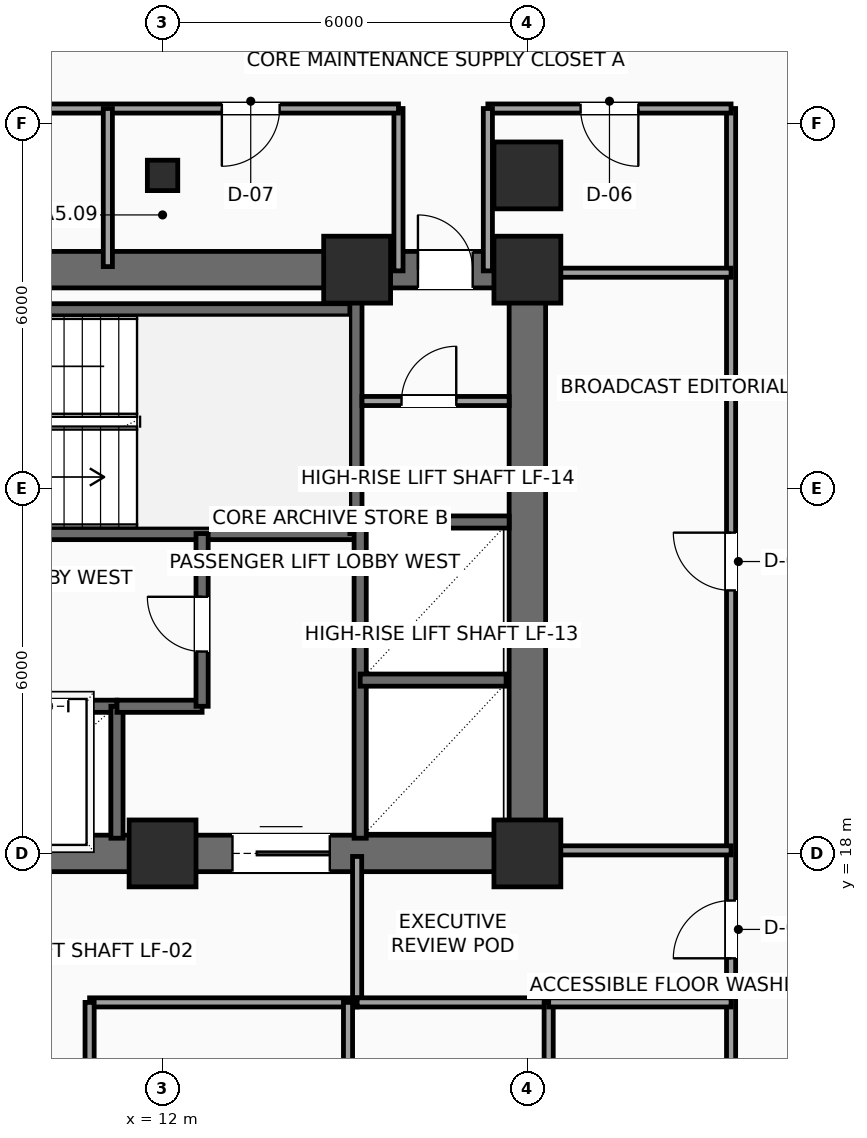
"""IFC4 building model, lengths in metres.
Left out: names, types, materials, properties, quantities, classifications, styles, units other than length and angle.
Written with IfcOpenShell. Run it as: python <this file> out.ifc"""

import sys

from ifc_helpers import new_model, si_unit, direction, frame, frame_2d, origin, origin_2d, place, context, subcontext, project, spatial, rectangle, hollow_rectangle, extrude, element, fill, save


model = new_model("IFC4")
c1 = context("Model", 3, precision=1e-05, world=origin(), true_north=direction((0.0, 1.0)))
c2 = subcontext(c1, "Body", "Model", "MODEL_VIEW")
j1 = project(units=[si_unit("LENGTHUNIT", "METRE"), si_unit("PLANEANGLEUNIT", "RADIAN")], contexts=[c1])
p1 = place(None, origin())
s1 = spatial("IfcSite", under=j1, at=p1, CompositionType="ELEMENT")
p2 = place(p1, origin())
s2 = spatial("IfcBuilding", under=s1, at=p2, CompositionType="ELEMENT")
p3 = place(p2, frame((0.0, 0.0, 160.65)))
s3 = spatial("IfcBuildingStorey", under=s2, at=p3, CompositionType="ELEMENT", Elevation=160.65)
for number, where, z_axis, x_axis in (
    (1, (12.0, 18.0, 0.0), (0.0, 0.0, 1.0), (1.0, 0.0, 0.0)),
    (2, (18.0, 18.0, 0.0), (0.0, 0.0, 1.0), (1.0, 0.0, 0.0)),
    (3, (15.2, 27.6, 0.0), (0.0, 0.0, 1.0), (1.0, 0.0, 0.0)),
    (4, (18.0, 27.6, 0.0), (0.0, 0.0, 1.0), (1.0, 0.0, 0.0)),
):
    element("IfcColumn", number, at=place(p3, frame(where, z_axis=z_axis, x_axis=x_axis)), inside=s3, PredefinedType="COLUMN", context=c2, shape_type="SweptSolid", body=[
        extrude(rectangle(XDim=1.1, YDim=1.1, at=origin_2d()), origin(), (0.0, 0.0, 1.0), 3.75),
    ])
p4 = place(p3, frame((12.0, 29.15, 0.0), z_axis=(0.0, 0.0, 1.0), x_axis=(1.0, 0.0, 0.0)))
e5 = element("IfcColumn", 5, at=p4, inside=s3, PredefinedType="COLUMN", context=c2, shape_type="SweptSolid", body=[
    extrude(hollow_rectangle(XDim=0.5, YDim=0.5, WallThickness=0.025, InnerFilletRadius=0.025, OuterFilletRadius=0.04, at=origin_2d()), origin(), (0.0, 0.0, 1.0), 3.75),
])
p5 = place(p3, frame((18.0, 29.15, 0.0), z_axis=(0.0, 0.0, 1.0), x_axis=(1.0, 0.0, 0.0)))
e6 = element("IfcColumn", 6, at=p5, inside=s3, PredefinedType="COLUMN", context=c2, shape_type="SweptSolid", body=[
    extrude(rectangle(XDim=1.1, YDim=1.1, at=origin_2d()), origin(), (0.0, 0.0, 1.0), 3.75),
])
p6 = place(p3, frame((6.0, 18.0, 0.0), z_axis=(0.0, 0.0, 1.0), x_axis=(1.0, 0.0, 0.0)))
e7 = element("IfcWall", 7, at=p6, inside=s3, PredefinedType="SHEAR", context=c2, shape_type="SweptSolid", body=[
    extrude(rectangle(XDim=12.0, YDim=0.6, at=frame_2d((6.0, 0.0))), origin(), (0.0, 0.0, 1.0), 3.425),
])
p7 = place(p6, frame((7.15, 0.0, 0.0)))
e8 = element("IfcOpeningElement", 8, at=p7, cuts=e7, PredefinedType="OPENING", context=c2, shape_type="SweptSolid", body=[
    extrude(rectangle(XDim=1.6, YDim=2.3, at=frame_2d((0.8, 1.15))), frame((0.0, 0.31, 0.0), z_axis=(0.0, -1.0, 0.0), x_axis=(1.0, 0.0, 0.0)), (0.0, 0.0, 1.0), 0.62),
])
p8 = place(p3, frame((6.0, 27.6, 0.0), z_axis=(0.0, 0.0, 1.0), x_axis=(1.0, 0.0, 0.0)))
e9 = element("IfcWall", 9, at=p8, inside=s3, PredefinedType="SHEAR", context=c2, shape_type="SweptSolid", body=[
    extrude(rectangle(XDim=12.0, YDim=0.6, at=frame_2d((6.0, 0.0))), origin(), (0.0, 0.0, 1.0), 3.425),
])
p9 = place(p8, frame((10.2, 0.0, 0.0)))
e10 = element("IfcOpeningElement", 10, at=p9, cuts=e9, PredefinedType="OPENING", context=c2, shape_type="SweptSolid", body=[
    extrude(rectangle(XDim=0.9, YDim=2.15, at=frame_2d((0.45, 1.075))), frame((0.0, 0.31, 0.0), z_axis=(0.0, -1.0, 0.0), x_axis=(1.0, 0.0, 0.0)), (0.0, 0.0, 1.0), 0.62),
])
p10 = place(p3, frame((18.0, 18.0, 0.0), z_axis=(0.0, 0.0, 1.0), x_axis=(0.0, 1.0, 0.0)))
e11 = element("IfcWall", 11, at=p10, inside=s3, PredefinedType="SHEAR", context=c2, shape_type="SweptSolid", body=[
    extrude(rectangle(XDim=9.6, YDim=0.6, at=frame_2d((4.8, 0.0))), origin(), (0.0, 0.0, 1.0), 3.425),
])
p11 = place(p3, frame((6.3, 23.26, 0.0), z_axis=(0.0, 0.0, 1.0), x_axis=(1.0, 0.0, 0.0)))
e12 = element("IfcWall", 12, at=p11, inside=s3, PredefinedType="SHEAR", context=c2, shape_type="SweptSolid", body=[
    extrude(rectangle(XDim=8.88, YDim=0.2, at=frame_2d((4.44, 0.0))), origin(), (0.0, 0.0, 1.0), 3.425),
])
p12 = place(p11, frame((0.35, 0.0, 0.0)))
e13 = element("IfcOpeningElement", 13, at=p12, cuts=e12, PredefinedType="OPENING", context=c2, shape_type="SweptSolid", body=[
    extrude(rectangle(XDim=1.1, YDim=2.2, at=frame_2d((0.55, 1.1))), frame((0.0, 0.11, 0.0), z_axis=(0.0, -1.0, 0.0), x_axis=(1.0, 0.0, 0.0)), (0.0, 0.0, 1.0), 0.22),
])
p13 = place(p3, frame((6.3, 26.94, 0.0), z_axis=(0.0, 0.0, 1.0), x_axis=(1.0, 0.0, 0.0)))
e14 = element("IfcWall", 14, at=p13, inside=s3, PredefinedType="SHEAR", context=c2, shape_type="SweptSolid", body=[
    extrude(rectangle(XDim=8.88, YDim=0.2, at=frame_2d((4.44, 0.0))), origin(), (0.0, 0.0, 1.0), 3.425),
])
p14 = place(p3, frame((15.18, 23.26, 0.0), z_axis=(0.0, 0.0, 1.0), x_axis=(0.0, 1.0, 0.0)))
e15 = element("IfcWall", 15, at=p14, inside=s3, PredefinedType="SHEAR", context=c2, shape_type="SweptSolid", body=[
    extrude(rectangle(XDim=4.04, YDim=0.2, at=frame_2d((2.02, 0.0))), origin(), (0.0, 0.0, 1.0), 3.425),
])
p15 = place(p3, frame((6.3, 20.42, 0.0), z_axis=(0.0, 0.0, 1.0), x_axis=(1.0, 0.0, 0.0)))
e16 = element("IfcWall", 16, at=p15, inside=s3, PredefinedType="SHEAR", context=c2, shape_type="SweptSolid", body=[
    extrude(rectangle(XDim=4.95, YDim=0.2, at=frame_2d((2.475, 0.0))), origin(), (0.0, 0.0, 1.0), 3.425),
])
p16 = place(p15, frame((0.65, 0.0, 0.0)))
e17 = element("IfcOpeningElement", 17, at=p16, cuts=e16, PredefinedType="OPENING", context=c2, shape_type="SweptSolid", body=[
    extrude(rectangle(XDim=1.1, YDim=2.2, at=frame_2d((0.55, 1.1))), frame((0.0, 0.11, 0.0), z_axis=(0.0, -1.0, 0.0), x_axis=(1.0, 0.0, 0.0)), (0.0, 0.0, 1.0), 0.22),
])
p17 = place(p15, frame((3.05, 0.0, 0.0)))
e18 = element("IfcOpeningElement", 18, at=p17, cuts=e16, PredefinedType="OPENING", context=c2, shape_type="SweptSolid", body=[
    extrude(rectangle(XDim=1.1, YDim=2.2, at=frame_2d((0.55, 1.1))), frame((0.0, 0.11, 0.0), z_axis=(0.0, -1.0, 0.0), x_axis=(1.0, 0.0, 0.0)), (0.0, 0.0, 1.0), 0.22),
])
p18 = place(p3, frame((11.25, 18.25, 0.0), z_axis=(0.0, 0.0, 1.0), x_axis=(0.0, 1.0, 0.0)))
e19 = element("IfcWall", 19, at=p18, inside=s3, PredefinedType="SHEAR", context=c2, shape_type="SweptSolid", body=[
    extrude(rectangle(XDim=2.17, YDim=0.2, at=frame_2d((1.085, 0.0))), origin(), (0.0, 0.0, 1.0), 3.425),
])
p19 = place(p3, frame((11.25, 20.42, 0.0), z_axis=(0.0, 0.0, 1.0), x_axis=(1.0, 0.0, 0.0)))
e20 = element("IfcWall", 20, at=p19, inside=s3, PredefinedType="SHEAR", context=c2, shape_type="SweptSolid", body=[
    extrude(rectangle(XDim=1.4, YDim=0.2, at=frame_2d((0.7, 0.0))), origin(), (0.0, 0.0, 1.0), 3.425),
])
p20 = place(p3, frame((12.65, 20.42, 0.0), z_axis=(0.0, 0.0, 1.0), x_axis=(0.0, 1.0, 0.0)))
e21 = element("IfcWall", 21, at=p20, inside=s3, PredefinedType="SHEAR", context=c2, shape_type="SweptSolid", body=[
    extrude(rectangle(XDim=2.84, YDim=0.2, at=frame_2d((1.42, 0.0))), origin(), (0.0, 0.0, 1.0), 3.425),
])
p21 = place(p20, frame((0.9, 0.0, 0.0)))
e22 = element("IfcOpeningElement", 22, at=p21, cuts=e21, PredefinedType="OPENING", context=c2, shape_type="SweptSolid", body=[
    extrude(rectangle(XDim=0.9, YDim=2.15, at=frame_2d((0.45, 1.075))), frame((0.0, 0.11, 0.0), z_axis=(0.0, -1.0, 0.0), x_axis=(1.0, 0.0, 0.0)), (0.0, 0.0, 1.0), 0.22),
])
p22 = place(p3, frame((15.25, 18.25, 0.0), z_axis=(0.0, 0.0, 1.0), x_axis=(0.0, 1.0, 0.0)))
e23 = element("IfcWall", 23, at=p22, inside=s3, PredefinedType="SHEAR", context=c2, shape_type="SweptSolid", body=[
    extrude(rectangle(XDim=5.2, YDim=0.2, at=frame_2d((2.6, 0.0))), origin(), (0.0, 0.0, 1.0), 3.425),
])
p23 = place(p3, frame((15.25, 20.85, 0.0), z_axis=(0.0, 0.0, 1.0), x_axis=(1.0, 0.0, 0.0)))
e24 = element("IfcWall", 24, at=p23, inside=s3, PredefinedType="SHEAR", context=c2, shape_type="SweptSolid", body=[
    extrude(rectangle(XDim=2.4, YDim=0.2, at=frame_2d((1.2, 0.0))), origin(), (0.0, 0.0, 1.0), 3.425),
])
p24 = place(p3, frame((15.25, 23.45, 0.0), z_axis=(0.0, 0.0, 1.0), x_axis=(1.0, 0.0, 0.0)))
e25 = element("IfcWall", 25, at=p24, inside=s3, PredefinedType="SHEAR", context=c2, shape_type="SweptSolid", body=[
    extrude(rectangle(XDim=2.45, YDim=0.2, at=frame_2d((1.225, 0.0))), origin(), (0.0, 0.0, 1.0), 3.425),
])
p25 = place(p3, frame((15.28, 25.44, 0.0), z_axis=(0.0, 0.0, 1.0), x_axis=(1.0, 0.0, 0.0)))
e26 = element("IfcWall", 26, at=p25, inside=s3, PredefinedType="PARTITIONING", context=c2, shape_type="SweptSolid", body=[
    extrude(rectangle(XDim=2.42, YDim=0.15, at=frame_2d((1.21, 0.0))), origin(), (0.0, 0.0, 1.0), 3.425),
])
p26 = place(p25, frame((0.65, 0.0, 0.0)))
e27 = element("IfcOpeningElement", 27, at=p26, cuts=e26, PredefinedType="OPENING", context=c2, shape_type="SweptSolid", body=[
    extrude(rectangle(XDim=0.9, YDim=2.15, at=frame_2d((0.45, 1.075))), frame((0.0, 0.085, 0.0), z_axis=(0.0, -1.0, 0.0), x_axis=(1.0, 0.0, 0.0)), (0.0, 0.0, 1.0), 0.17),
])
p27 = place(p3, frame((15.2, 17.95, 0.0), z_axis=(0.0, 0.0, 1.0), x_axis=(0.0, -1.0, 0.0)))
e28 = element("IfcWall", 28, at=p27, inside=s3, PredefinedType="PARTITIONING", context=c2, shape_type="SweptSolid", body=[
    extrude(rectangle(XDim=2.4, YDim=0.15, at=frame_2d((1.2, 0.0))), origin(), (0.0, 0.0, 1.0), 3.425),
])
p28 = place(p3, frame((15.2, 15.55, 0.0), z_axis=(0.0, 0.0, 1.0), x_axis=(-1.0, 0.0, 0.0)))
e29 = element("IfcWall", 29, at=p28, inside=s3, PredefinedType="PARTITIONING", context=c2, shape_type="SweptSolid", body=[
    extrude(rectangle(XDim=4.4, YDim=0.15, at=frame_2d((2.2, 0.0))), origin(), (0.0, 0.0, 1.0), 3.425),
])
p29 = place(p3, frame((10.8, 15.55, 0.0), z_axis=(0.0, 0.0, 1.0), x_axis=(0.0, -1.0, 0.0)))
e30 = element("IfcWall", 30, at=p29, inside=s3, PredefinedType="PARTITIONING", context=c2, shape_type="SweptSolid", body=[
    extrude(rectangle(XDim=4.3, YDim=0.15, at=frame_2d((2.15, 0.0))), origin(), (0.0, 0.0, 1.0), 3.425),
])
p30 = place(p3, frame((21.35, 11.25, 0.0), z_axis=(0.0, 0.0, 1.0), x_axis=(0.0, 1.0, 0.0)))
e31 = element("IfcWall", 31, at=p30, inside=s3, PredefinedType="PARTITIONING", context=c2, shape_type="SweptSolid", body=[
    extrude(rectangle(XDim=19.0, YDim=0.15, at=frame_2d((9.5, 0.0))), origin(), (0.0, 0.0, 1.0), 3.425),
])
p31 = place(p30, frame((11.075, 0.0, 0.0)))
e32 = element("IfcOpeningElement", 32, at=p31, cuts=e31, PredefinedType="OPENING", context=c2, shape_type="SweptSolid", body=[
    extrude(rectangle(XDim=0.95, YDim=2.15, at=frame_2d((0.475, 1.075))), frame((0.0, 0.085, 0.0), z_axis=(0.0, -1.0, 0.0), x_axis=(1.0, 0.0, 0.0)), (0.0, 0.0, 1.0), 0.17),
])
p32 = place(p30, frame((5.025, 0.0, 0.0)))
e33 = element("IfcOpeningElement", 33, at=p32, cuts=e31, PredefinedType="OPENING", context=c2, shape_type="SweptSolid", body=[
    extrude(rectangle(XDim=0.95, YDim=2.15, at=frame_2d((0.475, 1.075))), frame((0.0, 0.085, 0.0), z_axis=(0.0, -1.0, 0.0), x_axis=(1.0, 0.0, 0.0)), (0.0, 0.0, 1.0), 0.17),
])
p33 = place(p3, frame((21.35, 30.25, 0.0), z_axis=(0.0, 0.0, 1.0), x_axis=(-1.0, 0.0, 0.0)))
e34 = element("IfcWall", 34, at=p33, inside=s3, PredefinedType="PARTITIONING", context=c2, shape_type="SweptSolid", body=[
    extrude(rectangle(XDim=4.0, YDim=0.15, at=frame_2d((2.0, 0.0))), origin(), (0.0, 0.0, 1.0), 3.425),
])
p34 = place(p33, frame((1.525, 0.0, 0.0)))
e35 = element("IfcOpeningElement", 35, at=p34, cuts=e34, PredefinedType="OPENING", context=c2, shape_type="SweptSolid", body=[
    extrude(rectangle(XDim=0.95, YDim=2.15, at=frame_2d((0.475, 1.075))), frame((0.0, 0.085, 0.0), z_axis=(0.0, -1.0, 0.0), x_axis=(1.0, 0.0, 0.0)), (0.0, 0.0, 1.0), 0.17),
])
for number, where, z_axis, x_axis in (
    (36, (17.35, 30.25, 0.0), (0.0, 0.0, 1.0), (0.0, -1.0, 0.0)),
    (37, (15.88, 27.58, 0.0), (0.0, 0.0, 1.0), (0.0, 1.0, 0.0)),
):
    element("IfcWall", number, at=place(p3, frame(where, z_axis=z_axis, x_axis=x_axis)), inside=s3, PredefinedType="PARTITIONING", context=c2, shape_type="SweptSolid", body=[
        extrude(rectangle(XDim=2.67, YDim=0.15, at=frame_2d((1.335, 0.0))), origin(), (0.0, 0.0, 1.0), 3.425),
    ])
p35 = place(p3, frame((15.88, 30.25, 0.0), z_axis=(0.0, 0.0, 1.0), x_axis=(-1.0, 0.0, 0.0)))
e38 = element("IfcWall", 38, at=p35, inside=s3, PredefinedType="PARTITIONING", context=c2, shape_type="SweptSolid", body=[
    extrude(rectangle(XDim=15.58, YDim=0.15, at=frame_2d((7.79, 0.0))), origin(), (0.0, 0.0, 1.0), 3.425),
])
p36 = place(p35, frame((13.61, 0.0, 0.0)))
e39 = element("IfcOpeningElement", 39, at=p36, cuts=e38, PredefinedType="OPENING", context=c2, shape_type="SweptSolid", body=[
    extrude(rectangle(XDim=0.95, YDim=2.15, at=frame_2d((0.475, 1.075))), frame((0.0, 0.085, 0.0), z_axis=(0.0, -1.0, 0.0), x_axis=(1.0, 0.0, 0.0)), (0.0, 0.0, 1.0), 0.17),
])
p37 = place(p35, frame((10.855, 0.0, 0.0)))
e40 = element("IfcOpeningElement", 40, at=p37, cuts=e38, PredefinedType="OPENING", context=c2, shape_type="SweptSolid", body=[
    extrude(rectangle(XDim=0.95, YDim=2.15, at=frame_2d((0.475, 1.075))), frame((0.0, 0.085, 0.0), z_axis=(0.0, -1.0, 0.0), x_axis=(1.0, 0.0, 0.0)), (0.0, 0.0, 1.0), 0.17),
])
p38 = place(p35, frame((6.705, 0.0, 0.0)))
e41 = element("IfcOpeningElement", 41, at=p38, cuts=e38, PredefinedType="OPENING", context=c2, shape_type="SweptSolid", body=[
    extrude(rectangle(XDim=0.95, YDim=2.15, at=frame_2d((0.475, 1.075))), frame((0.0, 0.085, 0.0), z_axis=(0.0, -1.0, 0.0), x_axis=(1.0, 0.0, 0.0)), (0.0, 0.0, 1.0), 0.17),
])
p39 = place(p35, frame((1.955, 0.0, 0.0)))
e42 = element("IfcOpeningElement", 42, at=p39, cuts=e38, PredefinedType="OPENING", context=c2, shape_type="SweptSolid", body=[
    extrude(rectangle(XDim=0.95, YDim=2.15, at=frame_2d((0.475, 1.075))), frame((0.0, 0.085, 0.0), z_axis=(0.0, -1.0, 0.0), x_axis=(1.0, 0.0, 0.0)), (0.0, 0.0, 1.0), 0.17),
])
p40 = place(p3, frame((15.05, 11.25, 0.0), z_axis=(0.0, 0.0, 1.0), x_axis=(0.0, 1.0, 0.0)))
e43 = element("IfcWall", 43, at=p40, inside=s3, PredefinedType="PARTITIONING", context=c2, shape_type="SweptSolid", body=[
    extrude(rectangle(XDim=4.3, YDim=0.15, at=frame_2d((2.15, 0.0))), origin(), (0.0, 0.0, 1.0), 3.425),
])
p41 = place(p3, frame((15.2, 15.55, 0.0), z_axis=(0.0, 0.0, 1.0), x_axis=(1.0, 0.0, 0.0)))
e44 = element("IfcWall", 44, at=p41, inside=s3, PredefinedType="PARTITIONING", context=c2, shape_type="SweptSolid", body=[
    extrude(rectangle(XDim=3.15, YDim=0.15, at=frame_2d((1.575, 0.0))), origin(), (0.0, 0.0, 1.0), 3.425),
])
p42 = place(p3, frame((18.35, 11.25, 0.0), z_axis=(0.0, 0.0, 1.0), x_axis=(0.0, 1.0, 0.0)))
e45 = element("IfcWall", 45, at=p42, inside=s3, PredefinedType="PARTITIONING", context=c2, shape_type="SweptSolid", body=[
    extrude(rectangle(XDim=4.3, YDim=0.15, at=frame_2d((2.15, 0.0))), origin(), (0.0, 0.0, 1.0), 3.425),
])
p43 = place(p3, frame((18.35, 15.55, 0.0), z_axis=(0.0, 0.0, 1.0), x_axis=(1.0, 0.0, 0.0)))
e46 = element("IfcWall", 46, at=p43, inside=s3, PredefinedType="PARTITIONING", context=c2, shape_type="SweptSolid", body=[
    extrude(rectangle(XDim=3.0, YDim=0.15, at=frame_2d((1.5, 0.0))), origin(), (0.0, 0.0, 1.0), 3.425),
])
p44 = place(p3, frame((18.1, 18.05, 0.0), z_axis=(0.0, 0.0, 1.0), x_axis=(1.0, 0.0, 0.0)))
e47 = element("IfcWall", 47, at=p44, inside=s3, PredefinedType="PARTITIONING", context=c2, shape_type="SweptSolid", body=[
    extrude(rectangle(XDim=3.25, YDim=0.15, at=frame_2d((1.625, 0.0))), origin(), (0.0, 0.0, 1.0), 2.917),
])
p45 = place(p3, frame((18.1, 27.55, 0.0), z_axis=(0.0, 0.0, 1.0), x_axis=(1.0, 0.0, 0.0)))
e48 = element("IfcWall", 48, at=p45, inside=s3, PredefinedType="PARTITIONING", context=c2, shape_type="SweptSolid", body=[
    extrude(rectangle(XDim=3.25, YDim=0.15, at=frame_2d((1.625, 0.0))), origin(), (0.0, 0.0, 1.0), 3.425),
])
p46 = place(p3, frame((11.1, 27.65, 0.0), z_axis=(0.0, 0.0, 1.0), x_axis=(0.0, 1.0, 0.0)))
e49 = element("IfcWall", 49, at=p46, inside=s3, PredefinedType="PARTITIONING", context=c2, shape_type="SweptSolid", body=[
    extrude(rectangle(XDim=2.6, YDim=0.15, at=frame_2d((1.3, 0.0))), origin(), (0.0, 0.0, 1.0), 3.425),
])
p47 = place(p7, origin())
e50 = element("IfcDoor", 50, at=p47, inside=s3, OperationType="DOUBLE_DOOR_SLIDING", PredefinedType="DOOR", context=c2, shape_type="SweptSolid", body=[
    extrude(rectangle(XDim=1.6, YDim=2.3, at=frame_2d((0.8, 1.15))), frame((0.0, 0.025, 0.0), z_axis=(0.0, -1.0, 0.0), x_axis=(1.0, 0.0, 0.0)), (0.0, 0.0, 1.0), 0.05),
])
fill(e8, e50)
p48 = place(p9, origin())
e51 = element("IfcDoor", 51, at=p48, inside=s3, OperationType="SINGLE_SWING_LEFT", PredefinedType="DOOR", context=c2, shape_type="SweptSolid", body=[
    extrude(rectangle(XDim=0.9, YDim=2.15, at=frame_2d((0.45, 1.075))), frame((0.0, 0.025, 0.0), z_axis=(0.0, -1.0, 0.0), x_axis=(1.0, 0.0, 0.0)), (0.0, 0.0, 1.0), 0.05),
])
fill(e10, e51)
p49 = place(p17, origin())
e52 = element("IfcDoor", 52, at=p49, inside=s3, OperationType="SLIDING_TO_LEFT", PredefinedType="DOOR", context=c2, shape_type="SweptSolid", body=[
    extrude(rectangle(XDim=1.1, YDim=2.2, at=frame_2d((0.55, 1.1))), frame((0.0, 0.025, 0.0), z_axis=(0.0, -1.0, 0.0), x_axis=(1.0, 0.0, 0.0)), (0.0, 0.0, 1.0), 0.05),
])
fill(e18, e52)
p50 = place(p21, origin())
e53 = element("IfcDoor", 53, at=p50, inside=s3, OperationType="SINGLE_SWING_RIGHT", PredefinedType="DOOR", context=c2, shape_type="SweptSolid", body=[
    extrude(rectangle(XDim=0.9, YDim=2.15, at=frame_2d((0.45, 1.075))), frame((0.0, 0.025, 0.0), z_axis=(0.0, -1.0, 0.0), x_axis=(1.0, 0.0, 0.0)), (0.0, 0.0, 1.0), 0.05),
])
fill(e22, e53)
p51 = place(p26, origin())
e54 = element("IfcDoor", 54, at=p51, inside=s3, OperationType="SINGLE_SWING_RIGHT", PredefinedType="DOOR", context=c2, shape_type="SweptSolid", body=[
    extrude(rectangle(XDim=0.9, YDim=2.15, at=frame_2d((0.45, 1.075))), frame((0.0, 0.025, 0.0), z_axis=(0.0, -1.0, 0.0), x_axis=(1.0, 0.0, 0.0)), (0.0, 0.0, 1.0), 0.05),
])
fill(e27, e54)
p52 = place(p31, origin())
e55 = element("IfcDoor", 55, at=p52, inside=s3, OperationType="SINGLE_SWING_RIGHT", PredefinedType="DOOR", context=c2, shape_type="SweptSolid", body=[
    extrude(rectangle(XDim=0.95, YDim=2.15, at=frame_2d((0.475, 1.075))), frame((0.0, 0.025, 0.0), z_axis=(0.0, -1.0, 0.0), x_axis=(1.0, 0.0, 0.0)), (0.0, 0.0, 1.0), 0.05),
])
fill(e32, e55)
p53 = place(p32, origin())
e56 = element("IfcDoor", 56, at=p53, inside=s3, OperationType="SINGLE_SWING_LEFT", PredefinedType="DOOR", context=c2, shape_type="SweptSolid", body=[
    extrude(rectangle(XDim=0.95, YDim=2.15, at=frame_2d((0.475, 1.075))), frame((0.0, 0.025, 0.0), z_axis=(0.0, -1.0, 0.0), x_axis=(1.0, 0.0, 0.0)), (0.0, 0.0, 1.0), 0.05),
])
fill(e33, e56)
p54 = place(p34, origin())
e57 = element("IfcDoor", 57, at=p54, inside=s3, OperationType="SINGLE_SWING_LEFT", PredefinedType="DOOR", context=c2, shape_type="SweptSolid", body=[
    extrude(rectangle(XDim=0.95, YDim=2.15, at=frame_2d((0.475, 1.075))), frame((0.0, 0.025, 0.0), z_axis=(0.0, -1.0, 0.0), x_axis=(1.0, 0.0, 0.0)), (0.0, 0.0, 1.0), 0.05),
])
fill(e35, e57)
p55 = place(p39, origin())
e58 = element("IfcDoor", 58, at=p55, inside=s3, OperationType="SINGLE_SWING_RIGHT", PredefinedType="DOOR", context=c2, shape_type="SweptSolid", body=[
    extrude(rectangle(XDim=0.95, YDim=2.15, at=frame_2d((0.475, 1.075))), frame((0.0, 0.025, 0.0), z_axis=(0.0, -1.0, 0.0), x_axis=(1.0, 0.0, 0.0)), (0.0, 0.0, 1.0), 0.05),
])
fill(e42, e58)
save(model, sys.argv[1])
